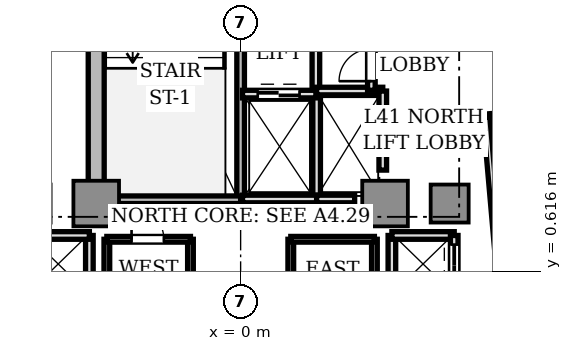
"""IFC4 building model, lengths in metres.
Left out: names, types, materials, properties, quantities, classifications, styles, units other than length and angle.
Written with IfcOpenShell. Run it as: python <this file> out.ifc"""

import sys

from ifc_helpers import new_model, si_unit, direction, frame, frame_2d, origin, origin_2d, place, context, subcontext, project, spatial, rectangle, extrude, source, transform, mapped, element, fill, save


model = new_model("IFC4")
c1 = context("Model", 3, precision=1e-05, world=origin(), true_north=direction((0.0, 1.0)))
c2 = subcontext(c1, "Body", "Model", "MODEL_VIEW")
j1 = project(units=[si_unit("LENGTHUNIT", "METRE"), si_unit("PLANEANGLEUNIT", "RADIAN")], contexts=[c1])
p1 = place(None, origin())
s1 = spatial("IfcSite", under=j1, at=p1, CompositionType="ELEMENT")
p2 = place(p1, origin())
s2 = spatial("IfcBuilding", under=s1, at=p2, CompositionType="ELEMENT")
p3 = place(p2, frame((0.0, 0.0, 150.6)))
s3 = spatial("IfcBuildingStorey", under=s2, at=p3, CompositionType="ELEMENT", Elevation=150.6)
p4 = place(p3, frame((-3.8, 2.85, 0.0), z_axis=(0.0, 0.0, 1.0), x_axis=(0.0, 1.0, 0.0)))
e1 = element("IfcWall", 1, at=p4, inside=s3, PredefinedType="SHEAR", context=c2, shape_type="SweptSolid", body=[
    extrude(rectangle(XDim=6.9, YDim=0.42, at=frame_2d((3.45, 0.0))), origin(), (0.0, 0.0, 1.0), 3.11),
])
m1 = source(origin(), c2, "Body", "SweptSolid", [
    extrude(rectangle(XDim=1.2, YDim=1.2, at=origin_2d()), origin(), (0.0, 0.0, 1.0), 3.11),
])
for number, where, z_axis, x_axis in (
    (2, (-3.8, 2.4, 0.0), (0.0, 0.0, 1.0), (1.0, 0.0, 0.0)),
    (3, (3.8, 2.4, 0.0), (0.0, 0.0, 1.0), (1.0, 0.0, 0.0)),
):
    element("IfcColumn", number, at=place(p3, frame(where, z_axis=z_axis, x_axis=x_axis)), inside=s3, PredefinedType="COLUMN", context=c2, shape_type="MappedRepresentation", body=[
        mapped(m1, transform((0.0, 0.0, 0.0), scale=1.0)),
    ])
m2 = source(origin(), c2, "Body", "SweptSolid", [
    extrude(rectangle(XDim=1.0, YDim=1.0, at=origin_2d()), origin(), (0.0, 0.0, 1.0), 3.11),
])
p5 = place(p3, frame((5.5, 2.4, 0.0), z_axis=(0.0, 0.0, 1.0), x_axis=(1.0, 0.0, 0.0)))
e4 = element("IfcColumn", 4, at=p5, inside=s3, PredefinedType="COLUMN", context=c2, shape_type="MappedRepresentation", body=[
    mapped(m2, transform((0.0, 0.0, 0.0), scale=1.0)),
])
p6 = place(p3, frame((0.0, 2.5, 0.0), z_axis=(0.0, 0.0, 1.0), x_axis=(0.0, 1.0, 0.0)))
e5 = element("IfcWall", 5, at=p6, inside=s3, PredefinedType="SOLIDWALL", context=c2, shape_type="SweptSolid", body=[
    extrude(rectangle(XDim=7.68, YDim=0.2, at=frame_2d((3.84, 0.0))), origin(), (0.0, 0.0, 1.0), 3.11),
])
p7 = place(p6, frame((6.36, 0.0, 0.0)))
e6 = element("IfcOpeningElement", 6, at=p7, cuts=e5, PredefinedType="OPENING", context=c2, shape_type="SweptSolid", body=[
    extrude(rectangle(XDim=1.1, YDim=2.15, at=frame_2d((0.55, 1.075))), frame((0.0, 0.11, 0.0), z_axis=(0.0, -1.0, 0.0), x_axis=(1.0, 0.0, 0.0)), (0.0, 0.0, 1.0), 0.22),
])
p8 = place(p3, frame((-3.72, 2.5, 0.0), z_axis=(0.0, 0.0, 1.0), x_axis=(1.0, 0.0, 0.0)))
e7 = element("IfcWall", 7, at=p8, inside=s3, PredefinedType="SOLIDWALL", context=c2, shape_type="SweptSolid", body=[
    extrude(rectangle(XDim=3.72, YDim=0.2, at=frame_2d((1.86, 0.0))), origin(), (0.0, 0.0, 1.0), 3.11),
])
p9 = place(p3, frame((1.98, 5.32, 0.0), z_axis=(0.0, 0.0, 1.0), x_axis=(0.0, 1.0, 0.0)))
e8 = element("IfcWall", 8, at=p9, inside=s3, PredefinedType="SOLIDWALL", context=c2, shape_type="SweptSolid", body=[
    extrude(rectangle(XDim=4.66, YDim=0.2, at=frame_2d((2.33, 0.0))), origin(), (0.0, 0.0, 1.0), 2.66),
])
p10 = place(p9, frame((3.04, 0.0, 0.0)))
e9 = element("IfcOpeningElement", 9, at=p10, cuts=e8, PredefinedType="OPENING", context=c2, shape_type="SweptSolid", body=[
    extrude(rectangle(XDim=0.85, YDim=2.1, at=frame_2d((0.425, 1.05))), frame((0.0, 0.11, 0.0), z_axis=(0.0, -1.0, 0.0), x_axis=(1.0, 0.0, 0.0)), (0.0, 0.0, 1.0), 0.22),
])
p11 = place(p3, frame((2.0, 2.5, 0.0), z_axis=(0.0, 0.0, 1.0), x_axis=(0.0, 1.0, 0.0)))
e10 = element("IfcWall", 10, at=p11, inside=s3, PredefinedType="SOLIDWALL", context=c2, shape_type="SweptSolid", body=[
    extrude(rectangle(XDim=2.78, YDim=0.2, at=frame_2d((1.39, 0.0))), origin(), (0.0, 0.0, 1.0), 2.66),
])
p12 = place(p3, frame((0.05, 2.52, 0.0), z_axis=(0.0, 0.0, 1.0), x_axis=(1.0, 0.0, 0.0)))
e11 = element("IfcWall", 11, at=p12, inside=s3, PredefinedType="SOLIDWALL", context=c2, shape_type="SweptSolid", body=[
    extrude(rectangle(XDim=1.95, YDim=0.2, at=frame_2d((0.975, 0.0))), origin(), (0.0, 0.0, 1.0), 2.66),
])
p13 = place(p3, frame((0.05, 5.28, 0.0), z_axis=(0.0, 0.0, 1.0), x_axis=(1.0, 0.0, 0.0)))
e12 = element("IfcWall", 12, at=p13, inside=s3, PredefinedType="SOLIDWALL", context=c2, shape_type="SweptSolid", body=[
    extrude(rectangle(XDim=1.93, YDim=0.2, at=frame_2d((0.965, 0.0))), origin(), (0.0, 0.0, 1.0), 2.66),
])
p14 = place(p13, frame((0.4, 0.0, 0.0)))
e13 = element("IfcOpeningElement", 13, at=p14, cuts=e12, PredefinedType="OPENING", context=c2, shape_type="SweptSolid", body=[
    extrude(rectangle(XDim=1.1, YDim=2.2, at=frame_2d((0.55, 1.1))), frame((0.0, 0.11, 0.0), z_axis=(0.0, -1.0, 0.0), x_axis=(1.0, 0.0, 0.0)), (0.0, 0.0, 1.0), 0.22),
])
p15 = place(p3, frame((2.0, 2.52, 0.0), z_axis=(0.0, 0.0, 1.0), x_axis=(1.0, 0.0, 0.0)))
e14 = element("IfcWall", 14, at=p15, inside=s3, PredefinedType="SOLIDWALL", context=c2, shape_type="SweptSolid", body=[
    extrude(rectangle(XDim=1.0, YDim=0.2, at=frame_2d((0.5, 0.0))), origin(), (0.0, 0.0, 1.0), 2.66),
])
p16 = place(p3, frame((2.0, 5.36, 0.0), z_axis=(0.0, 0.0, 1.0), x_axis=(1.0, 0.0, 0.0)))
e15 = element("IfcWall", 15, at=p16, inside=s3, PredefinedType="SOLIDWALL", context=c2, shape_type="SweptSolid", body=[
    extrude(rectangle(XDim=1.74, YDim=0.2, at=frame_2d((0.87, 0.0))), origin(), (0.0, 0.0, 1.0), 2.66),
])
p17 = place(p3, frame((3.74, 3.28, 0.0), z_axis=(0.0, 0.0, 1.0), x_axis=(0.0, 1.0, 0.0)))
e16 = element("IfcWall", 16, at=p17, inside=s3, PredefinedType="SOLIDWALL", context=c2, shape_type="SweptSolid", body=[
    extrude(rectangle(XDim=2.08, YDim=0.2, at=frame_2d((1.04, 0.0))), origin(), (0.0, 0.0, 1.0), 2.66),
])
p18 = place(p17, frame((0.44, 0.0, 0.0)))
e17 = element("IfcOpeningElement", 17, at=p18, cuts=e16, PredefinedType="OPENING", context=c2, shape_type="SweptSolid", body=[
    extrude(rectangle(XDim=1.2, YDim=2.2, at=frame_2d((0.6, 1.1))), frame((0.0, 0.11, 0.0), z_axis=(0.0, -1.0, 0.0), x_axis=(1.0, 0.0, 0.0)), (0.0, 0.0, 1.0), 0.22),
])
p19 = place(p3, frame((3.98, -1.56, 0.0), z_axis=(0.0, 0.0, 1.0), x_axis=(0.0, 1.0, 0.0)))
e18 = element("IfcWall", 18, at=p19, inside=s3, PredefinedType="SOLIDWALL", context=c2, shape_type="SweptSolid", body=[
    extrude(rectangle(XDim=3.12, YDim=0.2, at=frame_2d((1.56, 0.0))), origin(), (0.0, 0.0, 1.0), 2.28),
])
p20 = place(p3, frame((3.98, 1.56, 0.0), z_axis=(0.0, 0.0, 1.0), x_axis=(1.0, 0.0, 0.0)))
e19 = element("IfcWall", 19, at=p20, inside=s3, PredefinedType="SOLIDWALL", context=c2, shape_type="SweptSolid", body=[
    extrude(rectangle(XDim=1.64, YDim=0.2, at=frame_2d((0.82, 0.0))), origin(), (0.0, 0.0, 1.0), 2.66),
])
p21 = place(p3, frame((5.62, 0.0, 0.0), z_axis=(0.0, 0.0, 1.0), x_axis=(0.0, 1.0, 0.0)))
e20 = element("IfcWall", 20, at=p21, inside=s3, PredefinedType="SOLIDWALL", context=c2, shape_type="SweptSolid", body=[
    extrude(rectangle(XDim=1.56, YDim=0.2, at=frame_2d((0.78, 0.0))), origin(), (0.0, 0.0, 1.0), 2.66),
])
p22 = place(p21, frame((0.22, 0.0, 0.0)))
e21 = element("IfcOpeningElement", 21, at=p22, cuts=e20, PredefinedType="OPENING", context=c2, shape_type="SweptSolid", body=[
    extrude(rectangle(XDim=1.1, YDim=2.2, at=frame_2d((0.55, 1.1))), frame((0.0, 0.11, 0.0), z_axis=(0.0, -1.0, 0.0), x_axis=(1.0, 0.0, 0.0)), (0.0, 0.0, 1.0), 0.22),
])
p23 = place(p3, frame((-3.98, -1.56, 0.0), z_axis=(0.0, 0.0, 1.0), x_axis=(0.0, 1.0, 0.0)))
e22 = element("IfcWall", 22, at=p23, inside=s3, PredefinedType="SOLIDWALL", context=c2, shape_type="SweptSolid", body=[
    extrude(rectangle(XDim=3.12, YDim=0.2, at=frame_2d((1.56, 0.0))), origin(), (0.0, 0.0, 1.0), 2.28),
])
p24 = place(p3, frame((-5.62, 1.56, 0.0), z_axis=(0.0, 0.0, 1.0), x_axis=(1.0, 0.0, 0.0)))
e23 = element("IfcWall", 23, at=p24, inside=s3, PredefinedType="SOLIDWALL", context=c2, shape_type="SweptSolid", body=[
    extrude(rectangle(XDim=1.64, YDim=0.2, at=frame_2d((0.82, 0.0))), origin(), (0.0, 0.0, 1.0), 2.66),
])
p25 = place(p3, frame((3.44, 5.38, 0.0), z_axis=(0.0, 0.0, 1.0), x_axis=(0.0, 1.0, 0.0)))
e24 = element("IfcWall", 24, at=p25, inside=s3, PredefinedType="SOLIDWALL", context=c2, shape_type="SweptSolid", body=[
    extrude(rectangle(XDim=2.77, YDim=0.2, at=frame_2d((1.385, 0.0))), origin(), (0.0, 0.0, 1.0), 2.66),
])
p26 = place(p25, frame((0.24, 0.0, 0.0)))
e25 = element("IfcOpeningElement", 25, at=p26, cuts=e24, PredefinedType="OPENING", context=c2, shape_type="SweptSolid", body=[
    extrude(rectangle(XDim=0.85, YDim=2.1, at=frame_2d((0.425, 1.05))), frame((0.0, 0.11, 0.0), z_axis=(0.0, -1.0, 0.0), x_axis=(1.0, 0.0, 0.0)), (0.0, 0.0, 1.0), 0.22),
])
p27 = place(p25, frame((1.62, 0.0, 0.0)))
e26 = element("IfcOpeningElement", 26, at=p27, cuts=e24, PredefinedType="OPENING", context=c2, shape_type="SweptSolid", body=[
    extrude(rectangle(XDim=0.85, YDim=2.1, at=frame_2d((0.425, 1.05))), frame((0.0, 0.11, 0.0), z_axis=(0.0, -1.0, 0.0), x_axis=(1.0, 0.0, 0.0)), (0.0, 0.0, 1.0), 0.22),
])
p28 = place(p3, frame((-1.32, -1.46, 0.0), z_axis=(0.0, 0.0, 1.0), x_axis=(0.0, 1.0, 0.0)))
e27 = element("IfcWall", 27, at=p28, inside=s3, PredefinedType="PARTITIONING", context=c2, shape_type="SweptSolid", body=[
    extrude(rectangle(XDim=2.92, YDim=0.15, at=frame_2d((1.46, 0.0))), origin(), (0.0, 0.0, 1.0), 2.66),
])
p29 = place(p3, frame((-3.52, -1.46, 0.0), z_axis=(0.0, 0.0, 1.0), x_axis=(0.0, 1.0, 0.0)))
e28 = element("IfcWall", 28, at=p29, inside=s3, PredefinedType="PARTITIONING", context=c2, shape_type="SweptSolid", body=[
    extrude(rectangle(XDim=2.92, YDim=0.15, at=frame_2d((1.46, 0.0))), origin(), (0.0, 0.0, 1.0), 2.28),
])
p30 = place(p3, frame((-3.52, 1.46, 0.0), z_axis=(0.0, 0.0, 1.0), x_axis=(1.0, 0.0, 0.0)))
e29 = element("IfcWall", 29, at=p30, inside=s3, PredefinedType="PARTITIONING", context=c2, shape_type="SweptSolid", body=[
    extrude(rectangle(XDim=2.2, YDim=0.15, at=frame_2d((1.1, 0.0))), origin(), (0.0, 0.0, 1.0), 2.66),
])
p31 = place(p30, frame((0.65, 0.0, 0.0)))
e30 = element("IfcOpeningElement", 30, at=p31, cuts=e29, PredefinedType="OPENING", context=c2, shape_type="SweptSolid", body=[
    extrude(rectangle(XDim=0.85, YDim=2.1, at=frame_2d((0.425, 1.05))), frame((0.0, 0.085, 0.0), z_axis=(0.0, -1.0, 0.0), x_axis=(1.0, 0.0, 0.0)), (0.0, 0.0, 1.0), 0.17),
])
p32 = place(p3, frame((1.32, -1.46, 0.0), z_axis=(0.0, 0.0, 1.0), x_axis=(0.0, 1.0, 0.0)))
e31 = element("IfcWall", 31, at=p32, inside=s3, PredefinedType="PARTITIONING", context=c2, shape_type="SweptSolid", body=[
    extrude(rectangle(XDim=2.92, YDim=0.15, at=frame_2d((1.46, 0.0))), origin(), (0.0, 0.0, 1.0), 2.66),
])
p33 = place(p3, frame((3.52, -1.46, 0.0), z_axis=(0.0, 0.0, 1.0), x_axis=(0.0, 1.0, 0.0)))
e32 = element("IfcWall", 32, at=p33, inside=s3, PredefinedType="PARTITIONING", context=c2, shape_type="SweptSolid", body=[
    extrude(rectangle(XDim=2.92, YDim=0.15, at=frame_2d((1.46, 0.0))), origin(), (0.0, 0.0, 1.0), 2.28),
])
p34 = place(p3, frame((1.32, 1.46, 0.0), z_axis=(0.0, 0.0, 1.0), x_axis=(1.0, 0.0, 0.0)))
e33 = element("IfcWall", 33, at=p34, inside=s3, PredefinedType="PARTITIONING", context=c2, shape_type="SweptSolid", body=[
    extrude(rectangle(XDim=2.2, YDim=0.15, at=frame_2d((1.1, 0.0))), origin(), (0.0, 0.0, 1.0), 2.66),
])
p35 = place(p3, frame((6.467, 4.681, 0.0), z_axis=(0.0, 0.0, 1.0), x_axis=(0.996195452949, 0.087147114263, 0.0)))
e34 = element("IfcWall", 34, at=p35, inside=s3, PredefinedType="PARTITIONING", context=c2, shape_type="SweptSolid", body=[
    extrude(rectangle(XDim=8.55, YDim=0.15, at=frame_2d((4.275, 0.0))), origin(), (0.0, 0.0, 1.0), 2.66),
])
p36 = place(p35, frame((1.491, 0.0, 0.0)))
e35 = element("IfcOpeningElement", 35, at=p36, cuts=e34, PredefinedType="OPENING", context=c2, shape_type="SweptSolid", body=[
    extrude(rectangle(XDim=0.85, YDim=2.1, at=frame_2d((0.425, 1.05))), frame((0.0, 0.085, 0.0), z_axis=(0.0, -1.0, 0.0), x_axis=(1.0, 0.0, 0.0)), (0.0, 0.0, 1.0), 0.17),
])
p37 = place(p35, frame((4.792, 0.0, 0.0)))
e36 = element("IfcOpeningElement", 36, at=p37, cuts=e34, PredefinedType="OPENING", context=c2, shape_type="SweptSolid", body=[
    extrude(rectangle(XDim=0.85, YDim=2.1, at=frame_2d((0.425, 1.05))), frame((0.0, 0.085, 0.0), z_axis=(0.0, -1.0, 0.0), x_axis=(1.0, 0.0, 0.0)), (0.0, 0.0, 1.0), 0.17),
])
p38 = place(p3, frame((7.373, -5.679, 0.0), z_axis=(0.0, 0.0, 1.0), x_axis=(-0.087163455754, 0.996194023261, 0.0)))
e37 = element("IfcWall", 37, at=p38, inside=s3, PredefinedType="PARTITIONING", context=c2, shape_type="SweptSolid", body=[
    extrude(rectangle(XDim=10.4, YDim=0.18, at=frame_2d((5.2, 0.0))), origin(), (0.0, 0.0, 1.0), 2.66),
])
m3 = source(origin(), c2, "Body", "SweptSolid", [
    extrude(rectangle(XDim=1.1, YDim=0.05, at=origin_2d()), origin(), (0.0, 0.0, 1.0), 2.2),
])
p39 = place(p14, frame((0.55, 0.0, 0.0)))
e38 = element("IfcDoor", 38, at=p39, inside=s3, OperationType="DOUBLE_DOOR_SLIDING", PredefinedType="DOOR", context=c2, shape_type="MappedRepresentation", body=[
    mapped(m3, transform((0.0, 0.0, 0.0), scale=1.0)),
])
fill(e13, e38)
m4 = source(origin(), c2, "Body", "SweptSolid", [
    extrude(rectangle(XDim=1.2, YDim=0.05, at=origin_2d()), origin(), (0.0, 0.0, 1.0), 2.2),
])
p40 = place(p18, frame((0.6, 0.0, 0.0)))
e39 = element("IfcDoor", 39, at=p40, inside=s3, OperationType="DOUBLE_DOOR_SLIDING", PredefinedType="DOOR", context=c2, shape_type="MappedRepresentation", body=[
    mapped(m4, transform((0.0, 0.0, 0.0), scale=1.0)),
])
fill(e17, e39)
p41 = place(p22, frame((0.55, 0.0, 0.0)))
e40 = element("IfcDoor", 40, at=p41, inside=s3, OperationType="DOUBLE_DOOR_SLIDING", PredefinedType="DOOR", context=c2, shape_type="MappedRepresentation", body=[
    mapped(m3, transform((0.0, 0.0, 0.0), scale=1.0)),
])
fill(e21, e40)
m5 = source(origin(), c2, "Body", "SweptSolid", [
    extrude(rectangle(XDim=0.85, YDim=0.05, at=origin_2d()), origin(), (0.0, 0.0, 1.0), 2.1),
])
p42 = place(p26, frame((0.425, 0.0, 0.0)))
e41 = element("IfcDoor", 41, at=p42, inside=s3, OperationType="SINGLE_SWING_LEFT", PredefinedType="DOOR", context=c2, shape_type="MappedRepresentation", body=[
    mapped(m5, transform((0.0, 0.0, 0.0), scale=1.0)),
])
fill(e25, e41)
p43 = place(p31, frame((0.425, 0.0, 0.0)))
e42 = element("IfcDoor", 42, at=p43, inside=s3, OperationType="SINGLE_SWING_LEFT", PredefinedType="DOOR", context=c2, shape_type="MappedRepresentation", body=[
    mapped(m5, transform((0.0, 0.0, 0.0), scale=1.0)),
])
fill(e30, e42)
save(model, sys.argv[1])
